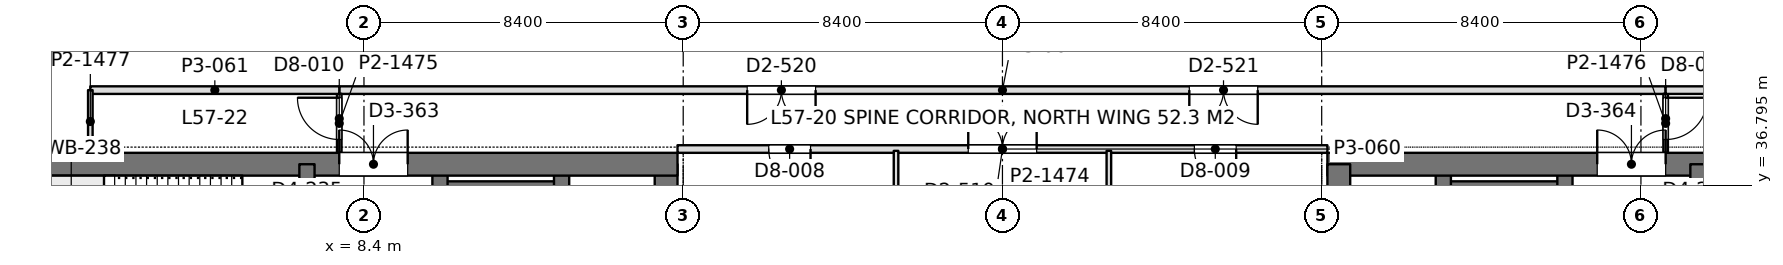
"""IFC4 building model, lengths in metres.
Left out: names, types, materials, properties, quantities, classifications, styles, units other than length and angle.
Written with IfcOpenShell. Run it as: python <this file> out.ifc"""

import sys

from ifc_helpers import new_model, si_unit, direction, frame, frame_2d, origin, place, context, subcontext, project, spatial, rectangle, extrude, element, fill, save


model = new_model("IFC4")
c1 = context("Model", 3, precision=1e-05, world=origin(), true_north=direction((0.0, 1.0)))
c2 = subcontext(c1, "Body", "Model", "MODEL_VIEW")
j1 = project(units=[si_unit("LENGTHUNIT", "METRE"), si_unit("PLANEANGLEUNIT", "RADIAN")], contexts=[c1])
p1 = place(None, origin())
s1 = spatial("IfcSite", under=j1, at=p1, CompositionType="ELEMENT")
p2 = place(p1, origin())
s2 = spatial("IfcBuilding", under=s1, at=p2, CompositionType="ELEMENT")
p3 = place(p2, frame((0.0, 0.0, 250.2)))
s3 = spatial("IfcBuildingStorey", under=s2, at=p3, CompositionType="ELEMENT", Elevation=250.2)
p4 = place(p3, frame((-1.05, 37.35, 0.0), z_axis=(0.0, 0.0, 1.0), x_axis=(1.0, 0.0, 0.0)))
e1 = element("IfcWall", 1, at=p4, inside=s3, PredefinedType="SHEAR", context=c2, shape_type="SweptSolid", body=[
    extrude(rectangle(XDim=17.7, YDim=0.6, at=frame_2d((8.85, 0.0))), origin(), (0.0, 0.0, 1.0), 4.5),
])
p5 = place(p4, frame((8.8, 0.0, 0.0)))
e2 = element("IfcOpeningElement", 2, at=p5, cuts=e1, PredefinedType="OPENING", context=c2, shape_type="SweptSolid", body=[
    extrude(rectangle(XDim=1.8, YDim=2.4, at=frame_2d((0.9, 1.2))), frame((0.0, 0.31, 0.0), z_axis=(0.0, -1.0, 0.0), x_axis=(1.0, 0.0, 0.0)), (0.0, 0.0, 1.0), 0.62),
])
p6 = place(p3, frame((16.35, 27.8, 0.0), z_axis=(0.0, 0.0, 1.0), x_axis=(0.0, 1.0, 0.0)))
e3 = element("IfcWall", 3, at=p6, inside=s3, PredefinedType="SHEAR", context=c2, shape_type="SweptSolid", body=[
    extrude(rectangle(XDim=9.55, YDim=0.6, at=frame_2d((4.775, 0.0))), origin(), (0.0, 0.0, 1.0), 4.5),
])
p7 = place(p3, frame((6.9, 13.05, 0.0), z_axis=(0.0, 0.0, 1.0), x_axis=(0.0, 1.0, 0.0)))
e4 = element("IfcWall", 4, at=p7, inside=s3, PredefinedType="SHEAR", context=c2, shape_type="SweptSolid", body=[
    extrude(rectangle(XDim=24.3, YDim=0.4, at=frame_2d((12.15, 0.0))), origin(), (0.0, 0.0, 1.0), 4.5),
])
p8 = place(p7, frame((1.3, 0.0, 0.0)))
e5 = element("IfcOpeningElement", 5, at=p8, cuts=e4, PredefinedType="OPENING", context=c2, shape_type="SweptSolid", body=[
    extrude(rectangle(XDim=1.0, YDim=2.2, at=frame_2d((0.5, 1.1))), frame((0.0, 0.21, 0.0), z_axis=(0.0, -1.0, 0.0), x_axis=(1.0, 0.0, 0.0)), (0.0, 0.0, 1.0), 0.42),
])
p9 = place(p7, frame((22.0, 0.0, 0.0)))
e6 = element("IfcOpeningElement", 6, at=p9, cuts=e4, PredefinedType="OPENING", context=c2, shape_type="SweptSolid", body=[
    extrude(rectangle(XDim=1.0, YDim=2.2, at=frame_2d((0.5, 1.1))), frame((0.0, 0.21, 0.0), z_axis=(0.0, -1.0, 0.0), x_axis=(1.0, 0.0, 0.0)), (0.0, 0.0, 1.0), 0.42),
])
p10 = place(p7, frame((5.55, 0.0, 0.0)))
e7 = element("IfcOpeningElement", 7, at=p10, cuts=e4, PredefinedType="OPENING", context=c2, shape_type="SweptSolid", body=[
    extrude(rectangle(XDim=1.0, YDim=2.2, at=frame_2d((0.5, 1.1))), frame((0.0, 0.21, 0.0), z_axis=(0.0, -1.0, 0.0), x_axis=(1.0, 0.0, 0.0)), (0.0, 0.0, 1.0), 0.42),
])
p11 = place(p7, frame((9.55, 0.0, 0.0)))
e8 = element("IfcOpeningElement", 8, at=p11, cuts=e4, PredefinedType="OPENING", context=c2, shape_type="SweptSolid", body=[
    extrude(rectangle(XDim=1.0, YDim=2.2, at=frame_2d((0.5, 1.1))), frame((0.0, 0.21, 0.0), z_axis=(0.0, -1.0, 0.0), x_axis=(1.0, 0.0, 0.0)), (0.0, 0.0, 1.0), 0.42),
])
p12 = place(p7, frame((12.8, 0.0, 0.0)))
e9 = element("IfcOpeningElement", 9, at=p12, cuts=e4, PredefinedType="OPENING", context=c2, shape_type="SweptSolid", body=[
    extrude(rectangle(XDim=1.1, YDim=2.2, at=frame_2d((0.55, 1.1))), frame((0.0, 0.21, 0.0), z_axis=(0.0, -1.0, 0.0), x_axis=(1.0, 0.0, 0.0)), (0.0, 0.0, 1.0), 0.42),
])
p13 = place(p7, frame((15.538, 0.0, 0.0)))
e10 = element("IfcOpeningElement", 10, at=p13, cuts=e4, PredefinedType="OPENING", context=c2, shape_type="SweptSolid", body=[
    extrude(rectangle(XDim=1.1, YDim=2.2, at=frame_2d((0.55, 1.1))), frame((0.0, 0.21, 0.0), z_axis=(0.0, -1.0, 0.0), x_axis=(1.0, 0.0, 0.0)), (0.0, 0.0, 1.0), 0.42),
])
p14 = place(p7, frame((18.262, 0.0, 0.0)))
e11 = element("IfcOpeningElement", 11, at=p14, cuts=e4, PredefinedType="OPENING", context=c2, shape_type="SweptSolid", body=[
    extrude(rectangle(XDim=1.1, YDim=2.2, at=frame_2d((0.55, 1.1))), frame((0.0, 0.21, 0.0), z_axis=(0.0, -1.0, 0.0), x_axis=(1.0, 0.0, 0.0)), (0.0, 0.0, 1.0), 0.42),
])
p15 = place(p3, frame((10.4, 13.05, 0.0), z_axis=(0.0, 0.0, 1.0), x_axis=(0.0, 1.0, 0.0)))
e12 = element("IfcWall", 12, at=p15, inside=s3, PredefinedType="SHEAR", context=c2, shape_type="SweptSolid", body=[
    extrude(rectangle(XDim=24.3, YDim=0.4, at=frame_2d((12.15, 0.0))), origin(), (0.0, 0.0, 1.0), 4.5),
])
p16 = place(p15, frame((15.75, 0.0, 0.0)))
e13 = element("IfcOpeningElement", 13, at=p16, cuts=e12, PredefinedType="OPENING", context=c2, shape_type="SweptSolid", body=[
    extrude(rectangle(XDim=1.1, YDim=2.2, at=frame_2d((0.55, 1.1))), frame((0.0, 0.21, 0.0), z_axis=(0.0, -1.0, 0.0), x_axis=(1.0, 0.0, 0.0)), (0.0, 0.0, 1.0), 0.42),
])
p17 = place(p15, frame((18.6, 0.0, 0.0)))
e14 = element("IfcOpeningElement", 14, at=p17, cuts=e12, PredefinedType="OPENING", context=c2, shape_type="SweptSolid", body=[
    extrude(rectangle(XDim=1.1, YDim=2.2, at=frame_2d((0.55, 1.1))), frame((0.0, 0.21, 0.0), z_axis=(0.0, -1.0, 0.0), x_axis=(1.0, 0.0, 0.0)), (0.0, 0.0, 1.0), 0.42),
])
p18 = place(p15, frame((21.45, 0.0, 0.0)))
e15 = element("IfcOpeningElement", 15, at=p18, cuts=e12, PredefinedType="OPENING", context=c2, shape_type="SweptSolid", body=[
    extrude(rectangle(XDim=1.1, YDim=2.2, at=frame_2d((0.55, 1.1))), frame((0.0, 0.21, 0.0), z_axis=(0.0, -1.0, 0.0), x_axis=(1.0, 0.0, 0.0)), (0.0, 0.0, 1.0), 0.42),
])
p19 = place(p15, frame((6.05, 0.0, 0.0)))
e16 = element("IfcOpeningElement", 16, at=p19, cuts=e12, PredefinedType="OPENING", context=c2, shape_type="SweptSolid", body=[
    extrude(rectangle(XDim=1.8, YDim=2.4, at=frame_2d((0.9, 1.2))), frame((0.0, 0.21, 0.0), z_axis=(0.0, -1.0, 0.0), x_axis=(1.0, 0.0, 0.0)), (0.0, 0.0, 1.0), 0.42),
])
p20 = place(p15, frame((11.25, 0.0, 0.0)))
e17 = element("IfcOpeningElement", 17, at=p20, cuts=e12, PredefinedType="OPENING", context=c2, shape_type="SweptSolid", body=[
    extrude(rectangle(XDim=1.8, YDim=2.4, at=frame_2d((0.9, 1.2))), frame((0.0, 0.21, 0.0), z_axis=(0.0, -1.0, 0.0), x_axis=(1.0, 0.0, 0.0)), (0.0, 0.0, 1.0), 0.42),
])
p21 = place(p3, frame((13.6, 27.925, 0.0), z_axis=(0.0, 0.0, 1.0), x_axis=(0.0, 1.0, 0.0)))
e18 = element("IfcWall", 18, at=p21, inside=s3, PredefinedType="SHEAR", context=c2, shape_type="SweptSolid", body=[
    extrude(rectangle(XDim=9.425, YDim=0.4, at=frame_2d((4.712, 0.0))), origin(), (0.0, 0.0, 1.0), 4.5),
])
p22 = place(p3, frame((10.4, 36.625, 0.0), z_axis=(0.0, 0.0, 1.0), x_axis=(1.0, 0.0, 0.0)))
e19 = element("IfcWall", 19, at=p22, inside=s3, PredefinedType="SHEAR", context=c2, shape_type="SweptSolid", body=[
    extrude(rectangle(XDim=3.2, YDim=0.55, at=frame_2d((1.6, 0.0))), origin(), (0.0, 0.0, 1.0), 4.5),
])
p23 = place(p3, frame((33.75, 37.35, 0.0), z_axis=(0.0, 0.0, 1.0), x_axis=(1.0, 0.0, 0.0)))
e20 = element("IfcWall", 20, at=p23, inside=s3, PredefinedType="SHEAR", context=c2, shape_type="SweptSolid", body=[
    extrude(rectangle(XDim=17.7, YDim=0.6, at=frame_2d((8.85, 0.0))), origin(), (0.0, 0.0, 1.0), 4.5),
])
p24 = place(p23, frame((7.1, 0.0, 0.0)))
e21 = element("IfcOpeningElement", 21, at=p24, cuts=e20, PredefinedType="OPENING", context=c2, shape_type="SweptSolid", body=[
    extrude(rectangle(XDim=1.8, YDim=2.4, at=frame_2d((0.9, 1.2))), frame((0.0, 0.31, 0.0), z_axis=(0.0, -1.0, 0.0), x_axis=(1.0, 0.0, 0.0)), (0.0, 0.0, 1.0), 0.62),
])
p25 = place(p3, frame((34.05, 27.8, 0.0), z_axis=(0.0, 0.0, 1.0), x_axis=(0.0, 1.0, 0.0)))
e22 = element("IfcWall", 22, at=p25, inside=s3, PredefinedType="SHEAR", context=c2, shape_type="SweptSolid", body=[
    extrude(rectangle(XDim=9.55, YDim=0.6, at=frame_2d((4.775, 0.0))), origin(), (0.0, 0.0, 1.0), 4.5),
])
p26 = place(p3, frame((43.5, 13.05, 0.0), z_axis=(0.0, 0.0, 1.0), x_axis=(0.0, 1.0, 0.0)))
e23 = element("IfcWall", 23, at=p26, inside=s3, PredefinedType="SHEAR", context=c2, shape_type="SweptSolid", body=[
    extrude(rectangle(XDim=24.3, YDim=0.4, at=frame_2d((12.15, 0.0))), origin(), (0.0, 0.0, 1.0), 4.5),
])
p27 = place(p26, frame((1.3, 0.0, 0.0)))
e24 = element("IfcOpeningElement", 24, at=p27, cuts=e23, PredefinedType="OPENING", context=c2, shape_type="SweptSolid", body=[
    extrude(rectangle(XDim=1.0, YDim=2.2, at=frame_2d((0.5, 1.1))), frame((0.0, 0.21, 0.0), z_axis=(0.0, -1.0, 0.0), x_axis=(1.0, 0.0, 0.0)), (0.0, 0.0, 1.0), 0.42),
])
p28 = place(p26, frame((22.0, 0.0, 0.0)))
e25 = element("IfcOpeningElement", 25, at=p28, cuts=e23, PredefinedType="OPENING", context=c2, shape_type="SweptSolid", body=[
    extrude(rectangle(XDim=1.0, YDim=2.2, at=frame_2d((0.5, 1.1))), frame((0.0, 0.21, 0.0), z_axis=(0.0, -1.0, 0.0), x_axis=(1.0, 0.0, 0.0)), (0.0, 0.0, 1.0), 0.42),
])
p29 = place(p26, frame((5.55, 0.0, 0.0)))
e26 = element("IfcOpeningElement", 26, at=p29, cuts=e23, PredefinedType="OPENING", context=c2, shape_type="SweptSolid", body=[
    extrude(rectangle(XDim=1.0, YDim=2.2, at=frame_2d((0.5, 1.1))), frame((0.0, 0.21, 0.0), z_axis=(0.0, -1.0, 0.0), x_axis=(1.0, 0.0, 0.0)), (0.0, 0.0, 1.0), 0.42),
])
p30 = place(p26, frame((9.55, 0.0, 0.0)))
e27 = element("IfcOpeningElement", 27, at=p30, cuts=e23, PredefinedType="OPENING", context=c2, shape_type="SweptSolid", body=[
    extrude(rectangle(XDim=1.0, YDim=2.2, at=frame_2d((0.5, 1.1))), frame((0.0, 0.21, 0.0), z_axis=(0.0, -1.0, 0.0), x_axis=(1.0, 0.0, 0.0)), (0.0, 0.0, 1.0), 0.42),
])
p31 = place(p26, frame((12.8, 0.0, 0.0)))
e28 = element("IfcOpeningElement", 28, at=p31, cuts=e23, PredefinedType="OPENING", context=c2, shape_type="SweptSolid", body=[
    extrude(rectangle(XDim=1.1, YDim=2.2, at=frame_2d((0.55, 1.1))), frame((0.0, 0.21, 0.0), z_axis=(0.0, -1.0, 0.0), x_axis=(1.0, 0.0, 0.0)), (0.0, 0.0, 1.0), 0.42),
])
p32 = place(p26, frame((15.538, 0.0, 0.0)))
e29 = element("IfcOpeningElement", 29, at=p32, cuts=e23, PredefinedType="OPENING", context=c2, shape_type="SweptSolid", body=[
    extrude(rectangle(XDim=1.1, YDim=2.2, at=frame_2d((0.55, 1.1))), frame((0.0, 0.21, 0.0), z_axis=(0.0, -1.0, 0.0), x_axis=(1.0, 0.0, 0.0)), (0.0, 0.0, 1.0), 0.42),
])
p33 = place(p26, frame((18.262, 0.0, 0.0)))
e30 = element("IfcOpeningElement", 30, at=p33, cuts=e23, PredefinedType="OPENING", context=c2, shape_type="SweptSolid", body=[
    extrude(rectangle(XDim=1.1, YDim=2.2, at=frame_2d((0.55, 1.1))), frame((0.0, 0.21, 0.0), z_axis=(0.0, -1.0, 0.0), x_axis=(1.0, 0.0, 0.0)), (0.0, 0.0, 1.0), 0.42),
])
p34 = place(p3, frame((40.0, 13.05, 0.0), z_axis=(0.0, 0.0, 1.0), x_axis=(0.0, 1.0, 0.0)))
e31 = element("IfcWall", 31, at=p34, inside=s3, PredefinedType="SHEAR", context=c2, shape_type="SweptSolid", body=[
    extrude(rectangle(XDim=24.3, YDim=0.4, at=frame_2d((12.15, 0.0))), origin(), (0.0, 0.0, 1.0), 4.5),
])
p35 = place(p34, frame((15.75, 0.0, 0.0)))
e32 = element("IfcOpeningElement", 32, at=p35, cuts=e31, PredefinedType="OPENING", context=c2, shape_type="SweptSolid", body=[
    extrude(rectangle(XDim=1.1, YDim=2.2, at=frame_2d((0.55, 1.1))), frame((0.0, 0.21, 0.0), z_axis=(0.0, -1.0, 0.0), x_axis=(1.0, 0.0, 0.0)), (0.0, 0.0, 1.0), 0.42),
])
p36 = place(p34, frame((18.6, 0.0, 0.0)))
e33 = element("IfcOpeningElement", 33, at=p36, cuts=e31, PredefinedType="OPENING", context=c2, shape_type="SweptSolid", body=[
    extrude(rectangle(XDim=1.1, YDim=2.2, at=frame_2d((0.55, 1.1))), frame((0.0, 0.21, 0.0), z_axis=(0.0, -1.0, 0.0), x_axis=(1.0, 0.0, 0.0)), (0.0, 0.0, 1.0), 0.42),
])
p37 = place(p34, frame((21.45, 0.0, 0.0)))
e34 = element("IfcOpeningElement", 34, at=p37, cuts=e31, PredefinedType="OPENING", context=c2, shape_type="SweptSolid", body=[
    extrude(rectangle(XDim=1.1, YDim=2.2, at=frame_2d((0.55, 1.1))), frame((0.0, 0.21, 0.0), z_axis=(0.0, -1.0, 0.0), x_axis=(1.0, 0.0, 0.0)), (0.0, 0.0, 1.0), 0.42),
])
p38 = place(p34, frame((6.05, 0.0, 0.0)))
e35 = element("IfcOpeningElement", 35, at=p38, cuts=e31, PredefinedType="OPENING", context=c2, shape_type="SweptSolid", body=[
    extrude(rectangle(XDim=1.8, YDim=2.4, at=frame_2d((0.9, 1.2))), frame((0.0, 0.21, 0.0), z_axis=(0.0, -1.0, 0.0), x_axis=(1.0, 0.0, 0.0)), (0.0, 0.0, 1.0), 0.42),
])
p39 = place(p34, frame((11.25, 0.0, 0.0)))
e36 = element("IfcOpeningElement", 36, at=p39, cuts=e31, PredefinedType="OPENING", context=c2, shape_type="SweptSolid", body=[
    extrude(rectangle(XDim=1.8, YDim=2.4, at=frame_2d((0.9, 1.2))), frame((0.0, 0.21, 0.0), z_axis=(0.0, -1.0, 0.0), x_axis=(1.0, 0.0, 0.0)), (0.0, 0.0, 1.0), 0.42),
])
p40 = place(p3, frame((36.8, 27.925, 0.0), z_axis=(0.0, 0.0, 1.0), x_axis=(0.0, 1.0, 0.0)))
e37 = element("IfcWall", 37, at=p40, inside=s3, PredefinedType="SHEAR", context=c2, shape_type="SweptSolid", body=[
    extrude(rectangle(XDim=9.425, YDim=0.4, at=frame_2d((4.712, 0.0))), origin(), (0.0, 0.0, 1.0), 4.5),
])
p41 = place(p3, frame((40.0, 36.625, 0.0), z_axis=(0.0, 0.0, 1.0), x_axis=(-1.0, 0.0, 0.0)))
e38 = element("IfcWall", 38, at=p41, inside=s3, PredefinedType="SHEAR", context=c2, shape_type="SweptSolid", body=[
    extrude(rectangle(XDim=3.2, YDim=0.55, at=frame_2d((1.6, 0.0))), origin(), (0.0, 0.0, 1.0), 4.5),
])
p42 = place(p3, frame((7.748, 39.3, 0.0), z_axis=(0.0, 0.0, 1.0), x_axis=(1.0, 0.0, 0.0)))
e39 = element("IfcWall", 39, at=p42, inside=s3, PredefinedType="PARTITIONING", context=c2, shape_type="SweptSolid", body=[
    extrude(rectangle(XDim=34.904, YDim=0.2, at=frame_2d((17.452, 0.0))), origin(), (0.0, 0.0, 1.0), 3.8),
])
p43 = place(p42, frame((10.735, 0.0, 0.0)))
e40 = element("IfcOpeningElement", 40, at=p43, cuts=e39, PredefinedType="OPENING", context=c2, shape_type="SweptSolid", body=[
    extrude(rectangle(XDim=1.8, YDim=2.2, at=frame_2d((0.9, 1.1))), frame((0.0, 0.11, 0.0), z_axis=(0.0, -1.0, 0.0), x_axis=(1.0, 0.0, 0.0)), (0.0, 0.0, 1.0), 0.22),
])
p44 = place(p42, frame((22.369, 0.0, 0.0)))
e41 = element("IfcOpeningElement", 41, at=p44, cuts=e39, PredefinedType="OPENING", context=c2, shape_type="SweptSolid", body=[
    extrude(rectangle(XDim=1.8, YDim=2.2, at=frame_2d((0.9, 1.1))), frame((0.0, 0.11, 0.0), z_axis=(0.0, -1.0, 0.0), x_axis=(1.0, 0.0, 0.0)), (0.0, 0.0, 1.0), 0.22),
])
p45 = place(p3, frame((7.75, 37.648, 0.0), z_axis=(0.0, 0.0, 1.0), x_axis=(0.0, 1.0, 0.0)))
e42 = element("IfcWall", 42, at=p45, inside=s3, PredefinedType="PARTITIONING", context=c2, shape_type="SweptSolid", body=[
    extrude(rectangle(XDim=1.554, YDim=0.12, at=frame_2d((0.777, 0.0))), origin(), (0.0, 0.0, 1.0), 4.35),
])
p46 = place(p45, frame((0.352, 0.0, 0.0)))
e43 = element("IfcOpeningElement", 43, at=p46, cuts=e42, PredefinedType="OPENING", context=c2, shape_type="SweptSolid", body=[
    extrude(rectangle(XDim=1.1, YDim=2.4, at=frame_2d((0.55, 1.2))), frame((0.0, 0.07, 0.0), z_axis=(0.0, -1.0, 0.0), x_axis=(1.0, 0.0, 0.0)), (0.0, 0.0, 1.0), 0.14),
])
p47 = place(p3, frame((42.65, 37.648, 0.0), z_axis=(0.0, 0.0, 1.0), x_axis=(0.0, 1.0, 0.0)))
e44 = element("IfcWall", 44, at=p47, inside=s3, PredefinedType="PARTITIONING", context=c2, shape_type="SweptSolid", body=[
    extrude(rectangle(XDim=1.554, YDim=0.12, at=frame_2d((0.777, 0.0))), origin(), (0.0, 0.0, 1.0), 4.35),
])
p48 = place(p47, frame((0.352, 0.0, 0.0)))
e45 = element("IfcOpeningElement", 45, at=p48, cuts=e44, PredefinedType="OPENING", context=c2, shape_type="SweptSolid", body=[
    extrude(rectangle(XDim=1.1, YDim=2.4, at=frame_2d((0.55, 1.2))), frame((0.0, 0.07, 0.0), z_axis=(0.0, -1.0, 0.0), x_axis=(1.0, 0.0, 0.0)), (0.0, 0.0, 1.0), 0.14),
])
p49 = place(p3, frame((1.2, 39.3, 0.0), z_axis=(0.0, 0.0, 1.0), x_axis=(1.0, 0.0, 0.0)))
e46 = element("IfcWall", 46, at=p49, inside=s3, PredefinedType="PARTITIONING", context=c2, shape_type="SweptSolid", body=[
    extrude(rectangle(XDim=6.552, YDim=0.2, at=frame_2d((3.276, 0.0))), origin(), (0.0, 0.0, 1.0), 3.99),
])
p50 = place(p3, frame((1.2, 37.648, 0.0), z_axis=(0.0, 0.0, 1.0), x_axis=(0.0, 1.0, 0.0)))
e47 = element("IfcWall", 47, at=p50, inside=s3, PredefinedType="PARTITIONING", context=c2, shape_type="SweptSolid", body=[
    extrude(rectangle(XDim=1.652, YDim=0.12, at=frame_2d((0.826, 0.0))), origin(), (0.0, 0.0, 1.0), 4.35),
])
p51 = place(p3, frame((42.648, 39.3, 0.0), z_axis=(0.0, 0.0, 1.0), x_axis=(1.0, 0.0, 0.0)))
e48 = element("IfcWall", 48, at=p51, inside=s3, PredefinedType="PARTITIONING", context=c2, shape_type="SweptSolid", body=[
    extrude(rectangle(XDim=6.552, YDim=0.2, at=frame_2d((3.276, 0.0))), origin(), (0.0, 0.0, 1.0), 3.99),
])
p52 = place(p3, frame((16.65, 37.75, 0.0), z_axis=(0.0, 0.0, 1.0), x_axis=(1.0, 0.0, 0.0)))
e49 = element("IfcWall", 49, at=p52, inside=s3, PredefinedType="PARTITIONING", context=c2, shape_type="SweptSolid", body=[
    extrude(rectangle(XDim=17.1, YDim=0.2, at=frame_2d((8.55, 0.0))), origin(), (0.0, 0.0, 1.0), 3.8),
])
p53 = place(p52, frame((2.4, 0.0, 0.0)))
e50 = element("IfcOpeningElement", 50, at=p53, cuts=e49, PredefinedType="OPENING", context=c2, shape_type="SweptSolid", body=[
    extrude(rectangle(XDim=1.1, YDim=2.4, at=frame_2d((0.55, 1.2))), frame((0.0, 0.11, 0.0), z_axis=(0.0, -1.0, 0.0), x_axis=(1.0, 0.0, 0.0)), (0.0, 0.0, 1.0), 0.22),
])
p54 = place(p52, frame((7.65, 0.0, 0.0)))
e51 = element("IfcOpeningElement", 51, at=p54, cuts=e49, PredefinedType="OPENING", context=c2, shape_type="SweptSolid", body=[
    extrude(rectangle(XDim=1.8, YDim=2.2, at=frame_2d((0.9, 1.1))), frame((0.0, 0.11, 0.0), z_axis=(0.0, -1.0, 0.0), x_axis=(1.0, 0.0, 0.0)), (0.0, 0.0, 1.0), 0.22),
])
p55 = place(p52, frame((13.6, 0.0, 0.0)))
e52 = element("IfcOpeningElement", 52, at=p55, cuts=e49, PredefinedType="OPENING", context=c2, shape_type="SweptSolid", body=[
    extrude(rectangle(XDim=1.1, YDim=2.4, at=frame_2d((0.55, 1.2))), frame((0.0, 0.11, 0.0), z_axis=(0.0, -1.0, 0.0), x_axis=(1.0, 0.0, 0.0)), (0.0, 0.0, 1.0), 0.22),
])
for number, where, z_axis, x_axis in (
    (53, (22.4, 33.208, 0.0), (0.0, 0.0, 1.0), (0.0, 1.0, 0.0)),
    (54, (28.0, 33.208, 0.0), (0.0, 0.0, 1.0), (0.0, 1.0, 0.0)),
):
    element("IfcWall", number, at=place(p3, frame(where, z_axis=z_axis, x_axis=x_axis)), inside=s3, PredefinedType="PARTITIONING", context=c2, shape_type="SweptSolid", body=[
        extrude(rectangle(XDim=4.494, YDim=0.12, at=frame_2d((2.247, 0.0))), origin(), (0.0, 0.0, 1.0), 3.5),
    ])
p56 = place(p5, origin())
e55 = element("IfcDoor", 55, at=p56, inside=s3, OperationType="DOUBLE_DOOR_SINGLE_SWING", PredefinedType="DOOR", context=c2, shape_type="SweptSolid", body=[
    extrude(rectangle(XDim=1.8, YDim=2.4, at=frame_2d((0.9, 1.2))), frame((0.0, 0.025, 0.0), z_axis=(0.0, -1.0, 0.0), x_axis=(1.0, 0.0, 0.0)), (0.0, 0.0, 1.0), 0.05),
])
fill(e2, e55)
p57 = place(p24, origin())
e56 = element("IfcDoor", 56, at=p57, inside=s3, OperationType="DOUBLE_DOOR_SINGLE_SWING", PredefinedType="DOOR", context=c2, shape_type="SweptSolid", body=[
    extrude(rectangle(XDim=1.8, YDim=2.4, at=frame_2d((0.9, 1.2))), frame((0.0, 0.025, 0.0), z_axis=(0.0, -1.0, 0.0), x_axis=(1.0, 0.0, 0.0)), (0.0, 0.0, 1.0), 0.05),
])
fill(e21, e56)
p58 = place(p43, frame((1.8, 0.0, 0.0), z_axis=(0.0, 0.0, 1.0), x_axis=(-1.0, 0.0, 0.0)))
e57 = element("IfcDoor", 57, at=p58, inside=s3, OperationType="DOUBLE_DOOR_SINGLE_SWING", PredefinedType="DOOR", context=c2, shape_type="SweptSolid", body=[
    extrude(rectangle(XDim=1.8, YDim=2.2, at=frame_2d((0.9, 1.1))), frame((0.0, 0.025, 0.0), z_axis=(0.0, -1.0, 0.0), x_axis=(1.0, 0.0, 0.0)), (0.0, 0.0, 1.0), 0.05),
])
fill(e40, e57)
p59 = place(p44, frame((1.8, 0.0, 0.0), z_axis=(0.0, 0.0, 1.0), x_axis=(-1.0, 0.0, 0.0)))
e58 = element("IfcDoor", 58, at=p59, inside=s3, OperationType="DOUBLE_DOOR_SINGLE_SWING", PredefinedType="DOOR", context=c2, shape_type="SweptSolid", body=[
    extrude(rectangle(XDim=1.8, YDim=2.2, at=frame_2d((0.9, 1.1))), frame((0.0, 0.025, 0.0), z_axis=(0.0, -1.0, 0.0), x_axis=(1.0, 0.0, 0.0)), (0.0, 0.0, 1.0), 0.05),
])
fill(e41, e58)
p60 = place(p46, origin())
e59 = element("IfcDoor", 59, at=p60, inside=s3, OperationType="SINGLE_SWING_RIGHT", PredefinedType="DOOR", context=c2, shape_type="SweptSolid", body=[
    extrude(rectangle(XDim=1.1, YDim=2.4, at=frame_2d((0.55, 1.2))), frame((0.0, 0.025, 0.0), z_axis=(0.0, -1.0, 0.0), x_axis=(1.0, 0.0, 0.0)), (0.0, 0.0, 1.0), 0.05),
])
fill(e43, e59)
p61 = place(p48, frame((1.1, 0.0, 0.0), z_axis=(0.0, 0.0, 1.0), x_axis=(-1.0, 0.0, 0.0)))
e60 = element("IfcDoor", 60, at=p61, inside=s3, OperationType="SINGLE_SWING_LEFT", PredefinedType="DOOR", context=c2, shape_type="SweptSolid", body=[
    extrude(rectangle(XDim=1.1, YDim=2.4, at=frame_2d((0.55, 1.2))), frame((0.0, 0.025, 0.0), z_axis=(0.0, -1.0, 0.0), x_axis=(1.0, 0.0, 0.0)), (0.0, 0.0, 1.0), 0.05),
])
fill(e45, e60)
p62 = place(p53, frame((1.1, 0.0, 0.0), z_axis=(0.0, 0.0, 1.0), x_axis=(-1.0, 0.0, 0.0)))
e61 = element("IfcDoor", 61, at=p62, inside=s3, OperationType="SINGLE_SWING_LEFT", PredefinedType="DOOR", context=c2, shape_type="SweptSolid", body=[
    extrude(rectangle(XDim=1.1, YDim=2.4, at=frame_2d((0.55, 1.2))), frame((0.0, 0.025, 0.0), z_axis=(0.0, -1.0, 0.0), x_axis=(1.0, 0.0, 0.0)), (0.0, 0.0, 1.0), 0.05),
])
fill(e50, e61)
p63 = place(p54, origin())
e62 = element("IfcDoor", 62, at=p63, inside=s3, OperationType="DOUBLE_DOOR_SINGLE_SWING", PredefinedType="DOOR", context=c2, shape_type="SweptSolid", body=[
    extrude(rectangle(XDim=1.8, YDim=2.2, at=frame_2d((0.9, 1.1))), frame((0.0, 0.025, 0.0), z_axis=(0.0, -1.0, 0.0), x_axis=(1.0, 0.0, 0.0)), (0.0, 0.0, 1.0), 0.05),
])
fill(e51, e62)
p64 = place(p55, frame((1.1, 0.0, 0.0), z_axis=(0.0, 0.0, 1.0), x_axis=(-1.0, 0.0, 0.0)))
e63 = element("IfcDoor", 63, at=p64, inside=s3, OperationType="SINGLE_SWING_LEFT", PredefinedType="DOOR", context=c2, shape_type="SweptSolid", body=[
    extrude(rectangle(XDim=1.1, YDim=2.4, at=frame_2d((0.55, 1.2))), frame((0.0, 0.025, 0.0), z_axis=(0.0, -1.0, 0.0), x_axis=(1.0, 0.0, 0.0)), (0.0, 0.0, 1.0), 0.05),
])
fill(e52, e63)
save(model, sys.argv[1])
